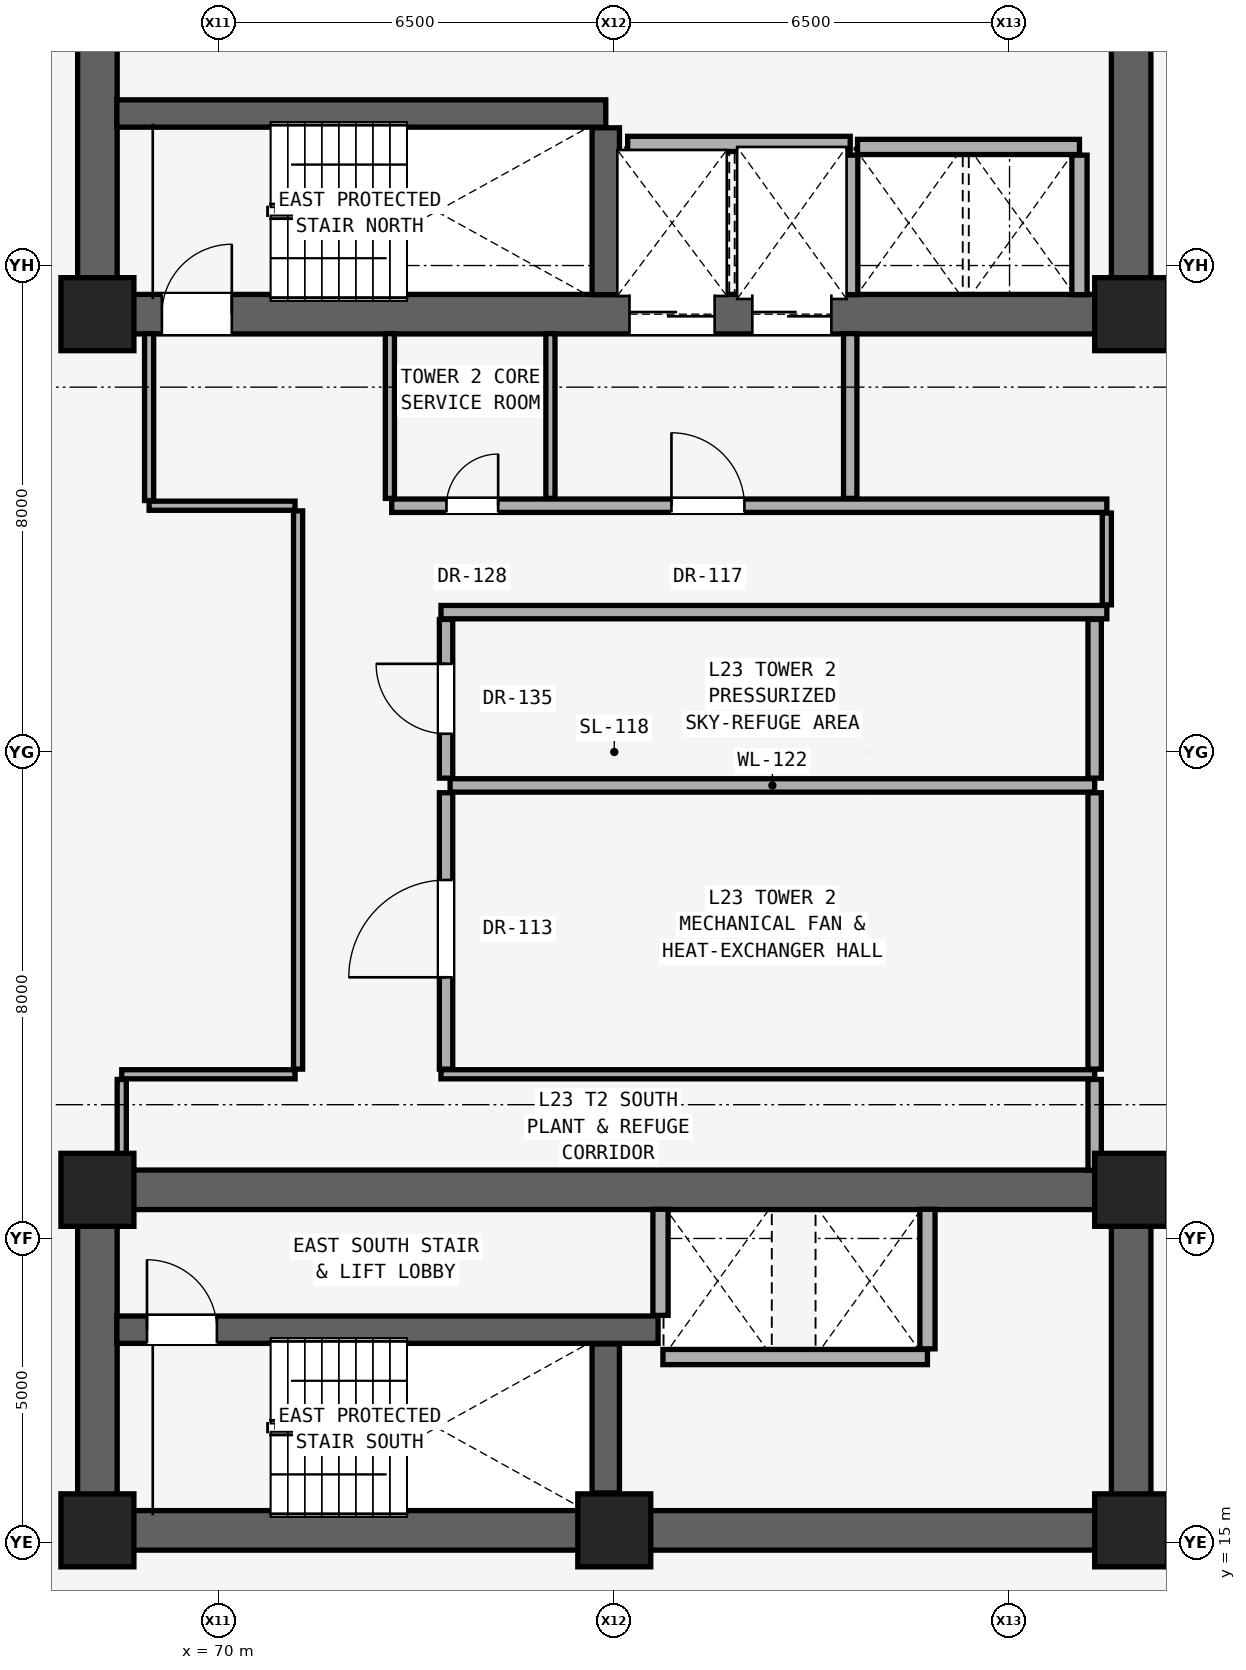
"""IFC4 building model, lengths in metres.
Left out: names, types, materials, properties, quantities, classifications, styles, units other than length and angle.
Written with IfcOpenShell. Run it as: python <this file> out.ifc"""

import sys

from ifc_helpers import new_model, si_unit, direction, frame, frame_2d, origin, origin_2d, place, context, subcontext, project, spatial, rectangle, extrude, element, fill, save


model = new_model("IFC4")
c1 = context("Model", 3, precision=1e-05, world=origin(), true_north=direction((0.0, 1.0)))
c2 = subcontext(c1, "Body", "Model", "MODEL_VIEW")
j1 = project(units=[si_unit("LENGTHUNIT", "METRE"), si_unit("PLANEANGLEUNIT", "RADIAN")], contexts=[c1])
p1 = place(None, origin())
s1 = spatial("IfcSite", under=j1, at=p1, CompositionType="ELEMENT")
p2 = place(p1, origin())
s2 = spatial("IfcBuilding", under=s1, at=p2, CompositionType="ELEMENT")
p3 = place(p2, frame((0.0, 0.0, 81.8)))
s3 = spatial("IfcBuildingStorey", under=s2, at=p3, CompositionType="ELEMENT", Elevation=81.8)
for number, where, z_axis, x_axis in (
    (1, (68.0, 15.2, 0.0), (0.0, 0.0, 1.0), (1.0, 0.0, 0.0)),
    (2, (76.5, 15.2, 0.0), (0.0, 0.0, 1.0), (1.0, 0.0, 0.0)),
    (3, (85.0, 15.2, 0.0), (0.0, 0.0, 1.0), (1.0, 0.0, 0.0)),
    (4, (68.0, 20.8, 0.0), (0.0, 0.0, 1.0), (1.0, 0.0, 0.0)),
    (5, (85.0, 20.8, 0.0), (0.0, 0.0, 1.0), (1.0, 0.0, 0.0)),
    (6, (68.0, 35.2, 0.0), (0.0, 0.0, 1.0), (1.0, 0.0, 0.0)),
    (7, (85.0, 35.2, 0.0), (0.0, 0.0, 1.0), (1.0, 0.0, 0.0)),
):
    element("IfcColumn", number, at=place(p3, frame(where, z_axis=z_axis, x_axis=x_axis)), inside=s3, PredefinedType="COLUMN", context=c2, shape_type="SweptSolid", body=[
        extrude(rectangle(XDim=1.2, YDim=1.2, at=origin_2d()), origin(), (0.0, 0.0, 1.0), 6.6),
    ])
for number, where, z_axis, x_axis in (
    (8, (68.0, 35.2, 0.0), (0.0, 0.0, 1.0), (0.0, 1.0, 0.0)),
    (9, (85.0, 35.2, 0.0), (0.0, 0.0, 1.0), (0.0, 1.0, 0.0)),
):
    element("IfcWall", number, at=place(p3, frame(where, z_axis=z_axis, x_axis=x_axis)), inside=s3, PredefinedType="SHEAR", context=c2, shape_type="SweptSolid", body=[
        extrude(rectangle(XDim=5.6, YDim=0.65, at=frame_2d((2.8, 0.0))), origin(), (0.0, 0.0, 1.0), 6.38),
    ])
p4 = place(p3, frame((68.0, 35.2, 0.0), z_axis=(0.0, 0.0, 1.0), x_axis=(1.0, 0.0, 0.0)))
e10 = element("IfcWall", 10, at=p4, inside=s3, PredefinedType="SHEAR", context=c2, shape_type="SweptSolid", body=[
    extrude(rectangle(XDim=17.0, YDim=0.65, at=frame_2d((8.5, 0.0))), origin(), (0.0, 0.0, 1.0), 6.38),
])
p5 = place(p4, frame((1.06, 0.0, 0.0)))
e11 = element("IfcOpeningElement", 11, at=p5, cuts=e10, PredefinedType="OPENING", context=c2, shape_type="SweptSolid", body=[
    extrude(rectangle(XDim=1.15, YDim=2.2, at=frame_2d((0.575, 1.1))), frame((0.0, 0.335, 0.0), z_axis=(0.0, -1.0, 0.0), x_axis=(1.0, 0.0, 0.0)), (0.0, 0.0, 1.0), 0.67),
])
p6 = place(p4, frame((8.75, 0.0, 0.0)))
e12 = element("IfcOpeningElement", 12, at=p6, cuts=e10, PredefinedType="OPENING", context=c2, shape_type="SweptSolid", body=[
    extrude(rectangle(XDim=1.4, YDim=2.35, at=frame_2d((0.7, 1.175))), frame((0.0, 0.335, 0.0), z_axis=(0.0, -1.0, 0.0), x_axis=(1.0, 0.0, 0.0)), (0.0, 0.0, 1.0), 0.67),
])
p7 = place(p4, frame((10.77, 0.0, 0.0)))
e13 = element("IfcOpeningElement", 13, at=p7, cuts=e10, PredefinedType="OPENING", context=c2, shape_type="SweptSolid", body=[
    extrude(rectangle(XDim=1.3, YDim=2.3, at=frame_2d((0.65, 1.15))), frame((0.0, 0.335, 0.0), z_axis=(0.0, -1.0, 0.0), x_axis=(1.0, 0.0, 0.0)), (0.0, 0.0, 1.0), 0.67),
])
p8 = place(p3, frame((68.0, 15.2, 0.0), z_axis=(0.0, 0.0, 1.0), x_axis=(1.0, 0.0, 0.0)))
e14 = element("IfcWall", 14, at=p8, inside=s3, PredefinedType="SHEAR", context=c2, shape_type="SweptSolid", body=[
    extrude(rectangle(XDim=17.0, YDim=0.65, at=frame_2d((8.5, 0.0))), origin(), (0.0, 0.0, 1.0), 6.38),
])
for number, where, z_axis, x_axis in (
    (15, (68.0, 15.2, 0.0), (0.0, 0.0, 1.0), (0.0, 1.0, 0.0)),
    (16, (85.0, 15.2, 0.0), (0.0, 0.0, 1.0), (0.0, 1.0, 0.0)),
):
    element("IfcWall", number, at=place(p3, frame(where, z_axis=z_axis, x_axis=x_axis)), inside=s3, PredefinedType="SHEAR", context=c2, shape_type="SweptSolid", body=[
        extrude(rectangle(XDim=5.6, YDim=0.65, at=frame_2d((2.8, 0.0))), origin(), (0.0, 0.0, 1.0), 6.38),
    ])
p9 = place(p3, frame((68.0, 20.8, 0.0), z_axis=(0.0, 0.0, 1.0), x_axis=(1.0, 0.0, 0.0)))
e17 = element("IfcWall", 17, at=p9, inside=s3, PredefinedType="SHEAR", context=c2, shape_type="SweptSolid", body=[
    extrude(rectangle(XDim=17.0, YDim=0.65, at=frame_2d((8.5, 0.0))), origin(), (0.0, 0.0, 1.0), 6.38),
])
p10 = place(p3, frame((77.3, 18.05, 0.0), z_axis=(0.0, 0.0, 1.0), x_axis=(1.0, 0.0, 0.0)))
e18 = element("IfcWall", 18, at=p10, inside=s3, PredefinedType="SOLIDWALL", context=c2, shape_type="SweptSolid", body=[
    extrude(rectangle(XDim=4.35, YDim=0.25, at=frame_2d((2.175, 0.0))), origin(), (0.0, 0.0, 1.0), 6.38),
])
p11 = place(p3, frame((68.32, 18.5, 0.0), z_axis=(0.0, 0.0, 1.0), x_axis=(1.0, 0.0, 0.0)))
e19 = element("IfcWall", 19, at=p11, inside=s3, PredefinedType="SHEAR", context=c2, shape_type="SweptSolid", body=[
    extrude(rectangle(XDim=8.9, YDim=0.45, at=frame_2d((4.45, 0.0))), origin(), (0.0, 0.0, 1.0), 6.38),
])
p12 = place(p11, frame((0.495, 0.0, 0.0)))
e20 = element("IfcOpeningElement", 20, at=p12, cuts=e19, PredefinedType="OPENING", context=c2, shape_type="SweptSolid", body=[
    extrude(rectangle(XDim=1.15, YDim=2.2, at=frame_2d((0.575, 1.1))), frame((0.0, 0.235, 0.0), z_axis=(0.0, -1.0, 0.0), x_axis=(1.0, 0.0, 0.0)), (0.0, 0.0, 1.0), 0.47),
])
p13 = place(p3, frame((68.4, 22.7, 0.0), z_axis=(0.0, 0.0, 1.0), x_axis=(1.0, 0.0, 0.0)))
e21 = element("IfcWall", 21, at=p13, inside=s3, PredefinedType="PARTITIONING", context=c2, shape_type="SweptSolid", body=[
    extrude(rectangle(XDim=2.85, YDim=0.15, at=frame_2d((1.425, 0.0))), origin(), (0.0, 0.0, 1.0), 6.38),
])
p14 = place(p3, frame((73.65, 22.7, 0.0), z_axis=(0.0, 0.0, 1.0), x_axis=(1.0, 0.0, 0.0)))
e22 = element("IfcWall", 22, at=p14, inside=s3, PredefinedType="PARTITIONING", context=c2, shape_type="SweptSolid", body=[
    extrude(rectangle(XDim=10.75, YDim=0.15, at=frame_2d((5.375, 0.0))), origin(), (0.0, 0.0, 1.0), 5.909),
])
p15 = place(p3, frame((73.8, 27.45, 0.0), z_axis=(0.0, 0.0, 1.0), x_axis=(1.0, 0.0, 0.0)))
e23 = element("IfcWall", 23, at=p15, inside=s3, PredefinedType="SOLIDWALL", context=c2, shape_type="SweptSolid", body=[
    extrude(rectangle(XDim=10.6, YDim=0.22, at=frame_2d((5.3, 0.0))), origin(), (0.0, 0.0, 1.0), 5.909),
])
p16 = place(p3, frame((73.65, 30.3, 0.0), z_axis=(0.0, 0.0, 1.0), x_axis=(1.0, 0.0, 0.0)))
e24 = element("IfcWall", 24, at=p16, inside=s3, PredefinedType="SOLIDWALL", context=c2, shape_type="SweptSolid", body=[
    extrude(rectangle(XDim=10.95, YDim=0.22, at=frame_2d((5.475, 0.0))), origin(), (0.0, 0.0, 1.0), 5.909),
])
p17 = place(p3, frame((68.85, 32.05, 0.0), z_axis=(0.0, 0.0, 1.0), x_axis=(1.0, 0.0, 0.0)))
e25 = element("IfcWall", 25, at=p17, inside=s3, PredefinedType="PARTITIONING", context=c2, shape_type="SweptSolid", body=[
    extrude(rectangle(XDim=2.4, YDim=0.15, at=frame_2d((1.2, 0.0))), origin(), (0.0, 0.0, 1.0), 6.38),
])
p18 = place(p3, frame((72.84, 32.05, 0.0), z_axis=(0.0, 0.0, 1.0), x_axis=(1.0, 0.0, 0.0)))
e26 = element("IfcWall", 26, at=p18, inside=s3, PredefinedType="SOLIDWALL", context=c2, shape_type="SweptSolid", body=[
    extrude(rectangle(XDim=11.76, YDim=0.22, at=frame_2d((5.88, 0.0))), origin(), (0.0, 0.0, 1.0), 5.909),
])
p19 = place(p18, frame((4.6, 0.0, 0.0)))
e27 = element("IfcOpeningElement", 27, at=p19, cuts=e26, PredefinedType="OPENING", context=c2, shape_type="SweptSolid", body=[
    extrude(rectangle(XDim=1.2, YDim=2.25, at=frame_2d((0.6, 1.125))), frame((0.0, 0.12, 0.0), z_axis=(0.0, -1.0, 0.0), x_axis=(1.0, 0.0, 0.0)), (0.0, 0.0, 1.0), 0.24),
])
p20 = place(p18, frame((0.9, 0.0, 0.0)))
e28 = element("IfcOpeningElement", 28, at=p20, cuts=e26, PredefinedType="OPENING", context=c2, shape_type="SweptSolid", body=[
    extrude(rectangle(XDim=0.85, YDim=2.01, at=frame_2d((0.425, 1.005))), frame((0.0, 0.12, 0.0), z_axis=(0.0, -1.0, 0.0), x_axis=(1.0, 0.0, 0.0)), (0.0, 0.0, 1.0), 0.24),
])
p21 = place(p3, frame((80.5, 37.95, 0.0), z_axis=(0.0, 0.0, 1.0), x_axis=(1.0, 0.0, 0.0)))
e29 = element("IfcWall", 29, at=p21, inside=s3, PredefinedType="SOLIDWALL", context=c2, shape_type="SweptSolid", body=[
    extrude(rectangle(XDim=3.65, YDim=0.25, at=frame_2d((1.825, 0.0))), origin(), (0.0, 0.0, 1.0), 6.38),
])
p22 = place(p3, frame((76.72, 38.0, 0.0), z_axis=(0.0, 0.0, 1.0), x_axis=(1.0, 0.0, 0.0)))
e30 = element("IfcWall", 30, at=p22, inside=s3, PredefinedType="SOLIDWALL", context=c2, shape_type="SweptSolid", body=[
    extrude(rectangle(XDim=3.66, YDim=0.25, at=frame_2d((1.83, 0.0))), origin(), (0.0, 0.0, 1.0), 6.38),
])
p23 = place(p3, frame((68.32, 38.5, 0.0), z_axis=(0.0, 0.0, 1.0), x_axis=(1.0, 0.0, 0.0)))
e31 = element("IfcWall", 31, at=p23, inside=s3, PredefinedType="SHEAR", context=c2, shape_type="SweptSolid", body=[
    extrude(rectangle(XDim=8.04, YDim=0.45, at=frame_2d((4.02, 0.0))), origin(), (0.0, 0.0, 1.0), 6.38),
])
p24 = place(p3, frame((68.4, 21.12, 0.0), z_axis=(0.0, 0.0, 1.0), x_axis=(0.0, 1.0, 0.0)))
e32 = element("IfcWall", 32, at=p24, inside=s3, PredefinedType="PARTITIONING", context=c2, shape_type="SweptSolid", body=[
    extrude(rectangle(XDim=1.495, YDim=0.15, at=frame_2d((0.748, 0.0))), origin(), (0.0, 0.0, 1.0), 6.38),
])
p25 = place(p3, frame((68.85, 32.135, 0.0), z_axis=(0.0, 0.0, 1.0), x_axis=(0.0, 1.0, 0.0)))
e33 = element("IfcWall", 33, at=p25, inside=s3, PredefinedType="PARTITIONING", context=c2, shape_type="SweptSolid", body=[
    extrude(rectangle(XDim=2.745, YDim=0.15, at=frame_2d((1.373, 0.0))), origin(), (0.0, 0.0, 1.0), 6.38),
])
p26 = place(p3, frame((71.3, 22.785, 0.0), z_axis=(0.0, 0.0, 1.0), x_axis=(0.0, 1.0, 0.0)))
e34 = element("IfcWall", 34, at=p26, inside=s3, PredefinedType="PARTITIONING", context=c2, shape_type="SweptSolid", body=[
    extrude(rectangle(XDim=9.18, YDim=0.15, at=frame_2d((4.59, 0.0))), origin(), (0.0, 0.0, 1.0), 5.445),
])
p27 = place(p3, frame((72.81, 32.17, 0.0), z_axis=(0.0, 0.0, 1.0), x_axis=(0.0, 1.0, 0.0)))
e35 = element("IfcWall", 35, at=p27, inside=s3, PredefinedType="PARTITIONING", context=c2, shape_type="SweptSolid", body=[
    extrude(rectangle(XDim=2.71, YDim=0.15, at=frame_2d((1.355, 0.0))), origin(), (0.0, 0.0, 1.0), 6.38),
])
p28 = place(p3, frame((73.733, 22.785, 0.0), z_axis=(0.0, 0.0, 1.0), x_axis=(0.0, 1.0, 0.0)))
e36 = element("IfcWall", 36, at=p28, inside=s3, PredefinedType="SOLIDWALL", context=c2, shape_type="SweptSolid", body=[
    extrude(rectangle(XDim=4.545, YDim=0.22, at=frame_2d((2.272, 0.0))), origin(), (0.0, 0.0, 1.0), 6.38),
])
p29 = place(p28, frame((1.51, 0.0, 0.0)))
e37 = element("IfcOpeningElement", 37, at=p29, cuts=e36, PredefinedType="OPENING", context=c2, shape_type="SweptSolid", body=[
    extrude(rectangle(XDim=1.6, YDim=2.3, at=frame_2d((0.8, 1.15))), frame((0.0, 0.12, 0.0), z_axis=(0.0, -1.0, 0.0), x_axis=(1.0, 0.0, 0.0)), (0.0, 0.0, 1.0), 0.24),
])
p30 = place(p3, frame((73.733, 27.57, 0.0), z_axis=(0.0, 0.0, 1.0), x_axis=(0.0, 1.0, 0.0)))
e38 = element("IfcWall", 38, at=p30, inside=s3, PredefinedType="SOLIDWALL", context=c2, shape_type="SweptSolid", body=[
    extrude(rectangle(XDim=2.61, YDim=0.22, at=frame_2d((1.305, 0.0))), origin(), (0.0, 0.0, 1.0), 5.445),
])
p31 = place(p30, frame((0.73, 0.0, 0.0)))
e39 = element("IfcOpeningElement", 39, at=p31, cuts=e38, PredefinedType="OPENING", context=c2, shape_type="SweptSolid", body=[
    extrude(rectangle(XDim=1.15, YDim=2.2, at=frame_2d((0.575, 1.1))), frame((0.0, 0.12, 0.0), z_axis=(0.0, -1.0, 0.0), x_axis=(1.0, 0.0, 0.0)), (0.0, 0.0, 1.0), 0.24),
])
p32 = place(p3, frame((75.45, 32.17, 0.0), z_axis=(0.0, 0.0, 1.0), x_axis=(0.0, 1.0, 0.0)))
e40 = element("IfcWall", 40, at=p32, inside=s3, PredefinedType="PARTITIONING", context=c2, shape_type="SweptSolid", body=[
    extrude(rectangle(XDim=2.71, YDim=0.15, at=frame_2d((1.355, 0.0))), origin(), (0.0, 0.0, 1.0), 6.38),
])
p33 = place(p3, frame((76.36, 15.815, 0.0), z_axis=(0.0, 0.0, 1.0), x_axis=(0.0, 1.0, 0.0)))
e41 = element("IfcWall", 41, at=p33, inside=s3, PredefinedType="SHEAR", context=c2, shape_type="SweptSolid", body=[
    extrude(rectangle(XDim=2.45, YDim=0.45, at=frame_2d((1.225, 0.0))), origin(), (0.0, 0.0, 1.0), 6.38),
])
p34 = place(p3, frame((76.36, 35.52, 0.0), z_axis=(0.0, 0.0, 1.0), x_axis=(0.0, 1.0, 0.0)))
e42 = element("IfcWall", 42, at=p34, inside=s3, PredefinedType="SHEAR", context=c2, shape_type="SweptSolid", body=[
    extrude(rectangle(XDim=2.745, YDim=0.45, at=frame_2d((1.373, 0.0))), origin(), (0.0, 0.0, 1.0), 6.38),
])
p35 = place(p3, frame((77.26, 18.735, 0.0), z_axis=(0.0, 0.0, 1.0), x_axis=(0.0, 1.0, 0.0)))
e43 = element("IfcWall", 43, at=p35, inside=s3, PredefinedType="SOLIDWALL", context=c2, shape_type="SweptSolid", body=[
    extrude(rectangle(XDim=1.745, YDim=0.25, at=frame_2d((0.873, 0.0))), origin(), (0.0, 0.0, 1.0), 6.38),
])
p36 = place(p3, frame((80.38, 32.17, 0.0), z_axis=(0.0, 0.0, 1.0), x_axis=(0.0, 1.0, 0.0)))
e44 = element("IfcWall", 44, at=p36, inside=s3, PredefinedType="SOLIDWALL", context=c2, shape_type="SweptSolid", body=[
    extrude(rectangle(XDim=2.71, YDim=0.22, at=frame_2d((1.355, 0.0))), origin(), (0.0, 0.0, 1.0), 6.38),
])
for number, where, z_axis, x_axis in (
    (45, (80.38, 35.52, 0.0), (0.0, 0.0, 1.0), (0.0, 1.0, 0.0)),
    (46, (81.65, 18.185, 0.0), (0.0, 0.0, 1.0), (0.0, 1.0, 0.0)),
    (47, (84.15, 35.52, 0.0), (0.0, 0.0, 1.0), (0.0, 1.0, 0.0)),
):
    element("IfcWall", number, at=place(p3, frame(where, z_axis=z_axis, x_axis=x_axis)), inside=s3, PredefinedType="SOLIDWALL", context=c2, shape_type="SweptSolid", body=[
        extrude(rectangle(XDim=2.295, YDim=0.25, at=frame_2d((1.147, 0.0))), origin(), (0.0, 0.0, 1.0), 6.38),
    ])
p37 = place(p3, frame((84.4, 21.12, 0.0), z_axis=(0.0, 0.0, 1.0), x_axis=(0.0, 1.0, 0.0)))
e48 = element("IfcWall", 48, at=p37, inside=s3, PredefinedType="SOLIDWALL", context=c2, shape_type="SweptSolid", body=[
    extrude(rectangle(XDim=1.495, YDim=0.22, at=frame_2d((0.748, 0.0))), origin(), (0.0, 0.0, 1.0), 6.38),
])
p38 = place(p3, frame((84.4, 22.785, 0.0), z_axis=(0.0, 0.0, 1.0), x_axis=(0.0, 1.0, 0.0)))
e49 = element("IfcWall", 49, at=p38, inside=s3, PredefinedType="SOLIDWALL", context=c2, shape_type="SweptSolid", body=[
    extrude(rectangle(XDim=4.545, YDim=0.22, at=frame_2d((2.272, 0.0))), origin(), (0.0, 0.0, 1.0), 6.38),
])
p39 = place(p3, frame((84.4, 27.57, 0.0), z_axis=(0.0, 0.0, 1.0), x_axis=(0.0, 1.0, 0.0)))
e50 = element("IfcWall", 50, at=p39, inside=s3, PredefinedType="SOLIDWALL", context=c2, shape_type="SweptSolid", body=[
    extrude(rectangle(XDim=2.61, YDim=0.22, at=frame_2d((1.305, 0.0))), origin(), (0.0, 0.0, 1.0), 5.445),
])
p40 = place(p3, frame((84.6, 30.42, 0.0), z_axis=(0.0, 0.0, 1.0), x_axis=(0.0, 1.0, 0.0)))
e51 = element("IfcWall", 51, at=p40, inside=s3, PredefinedType="PARTITIONING", context=c2, shape_type="SweptSolid", body=[
    extrude(rectangle(XDim=1.51, YDim=0.15, at=frame_2d((0.755, 0.0))), origin(), (0.0, 0.0, 1.0), 6.38),
])
p41 = place(p5, origin())
e52 = element("IfcDoor", 52, at=p41, inside=s3, OperationType="SINGLE_SWING_RIGHT", PredefinedType="DOOR", context=c2, shape_type="SweptSolid", body=[
    extrude(rectangle(XDim=1.15, YDim=2.2, at=frame_2d((0.575, 1.1))), frame((0.0, 0.025, 0.0), z_axis=(0.0, -1.0, 0.0), x_axis=(1.0, 0.0, 0.0)), (0.0, 0.0, 1.0), 0.05),
])
fill(e11, e52)
p42 = place(p19, origin())
e53 = element("IfcDoor", 53, at=p42, inside=s3, OperationType="SINGLE_SWING_LEFT", PredefinedType="DOOR", context=c2, shape_type="SweptSolid", body=[
    extrude(rectangle(XDim=1.2, YDim=2.25, at=frame_2d((0.6, 1.125))), frame((0.0, 0.025, 0.0), z_axis=(0.0, -1.0, 0.0), x_axis=(1.0, 0.0, 0.0)), (0.0, 0.0, 1.0), 0.05),
])
fill(e27, e53)
p43 = place(p20, origin())
e54 = element("IfcDoor", 54, at=p43, inside=s3, OperationType="SINGLE_SWING_RIGHT", PredefinedType="DOOR", context=c2, shape_type="SweptSolid", body=[
    extrude(rectangle(XDim=0.85, YDim=2.01, at=frame_2d((0.425, 1.005))), frame((0.0, 0.025, 0.0), z_axis=(0.0, -1.0, 0.0), x_axis=(1.0, 0.0, 0.0)), (0.0, 0.0, 1.0), 0.05),
])
fill(e28, e54)
p44 = place(p12, origin())
e55 = element("IfcDoor", 55, at=p44, inside=s3, OperationType="SINGLE_SWING_LEFT", PredefinedType="DOOR", context=c2, shape_type="SweptSolid", body=[
    extrude(rectangle(XDim=1.15, YDim=2.2, at=frame_2d((0.575, 1.1))), frame((0.0, 0.025, 0.0), z_axis=(0.0, -1.0, 0.0), x_axis=(1.0, 0.0, 0.0)), (0.0, 0.0, 1.0), 0.05),
])
fill(e20, e55)
p45 = place(p31, origin())
e56 = element("IfcDoor", 56, at=p45, inside=s3, OperationType="SINGLE_SWING_RIGHT", PredefinedType="DOOR", context=c2, shape_type="SweptSolid", body=[
    extrude(rectangle(XDim=1.15, YDim=2.2, at=frame_2d((0.575, 1.1))), frame((0.0, 0.025, 0.0), z_axis=(0.0, -1.0, 0.0), x_axis=(1.0, 0.0, 0.0)), (0.0, 0.0, 1.0), 0.05),
])
fill(e39, e56)
p46 = place(p29, origin())
e57 = element("IfcDoor", 57, at=p46, inside=s3, OperationType="SINGLE_SWING_LEFT", PredefinedType="DOOR", context=c2, shape_type="SweptSolid", body=[
    extrude(rectangle(XDim=1.6, YDim=2.3, at=frame_2d((0.8, 1.15))), frame((0.0, 0.025, 0.0), z_axis=(0.0, -1.0, 0.0), x_axis=(1.0, 0.0, 0.0)), (0.0, 0.0, 1.0), 0.05),
])
fill(e37, e57)
p47 = place(p6, origin())
e58 = element("IfcDoor", 58, at=p47, inside=s3, OperationType="DOUBLE_DOOR_SLIDING", PredefinedType="DOOR", context=c2, shape_type="SweptSolid", body=[
    extrude(rectangle(XDim=1.4, YDim=2.35, at=frame_2d((0.7, 1.175))), frame((0.0, 0.025, 0.0), z_axis=(0.0, -1.0, 0.0), x_axis=(1.0, 0.0, 0.0)), (0.0, 0.0, 1.0), 0.05),
])
fill(e12, e58)
p48 = place(p7, origin())
e59 = element("IfcDoor", 59, at=p48, inside=s3, OperationType="DOUBLE_DOOR_SLIDING", PredefinedType="DOOR", context=c2, shape_type="SweptSolid", body=[
    extrude(rectangle(XDim=1.3, YDim=2.3, at=frame_2d((0.65, 1.15))), frame((0.0, 0.025, 0.0), z_axis=(0.0, -1.0, 0.0), x_axis=(1.0, 0.0, 0.0)), (0.0, 0.0, 1.0), 0.05),
])
fill(e13, e59)
save(model, sys.argv[1])
